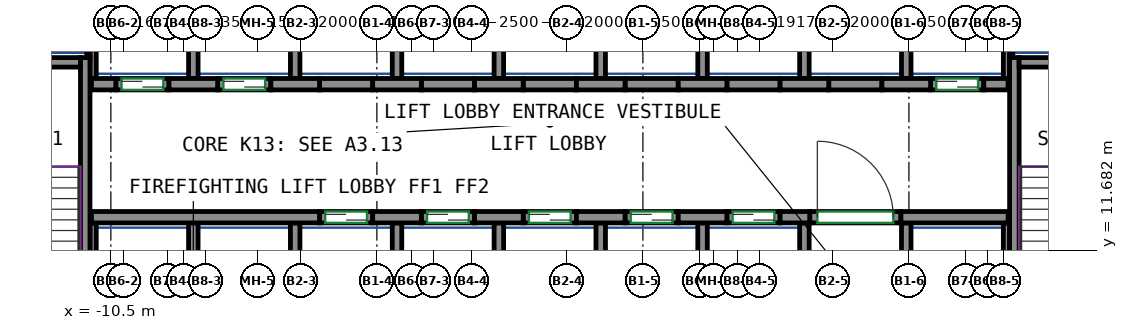
"""IFC4 building model, lengths in metres.
Left out: names, types, materials, properties, quantities, classifications, styles, units other than length and angle.
Written with IfcOpenShell. Run it as: python <this file> out.ifc"""

import sys

from ifc_helpers import new_model, si_unit, direction, frame, frame_2d, origin, place, context, subcontext, project, spatial, rectangle, extrude, source, transform, mapped, element, fill, save


model = new_model("IFC4")
c1 = context("Model", 3, precision=1e-05, world=origin(), true_north=direction((0.0, 1.0)))
c2 = subcontext(c1, "Body", "Model", "MODEL_VIEW")
j1 = project(units=[si_unit("LENGTHUNIT", "METRE"), si_unit("PLANEANGLEUNIT", "RADIAN")], contexts=[c1])
p1 = place(None, origin())
s1 = spatial("IfcSite", under=j1, at=p1, CompositionType="ELEMENT")
p2 = place(p1, origin())
s2 = spatial("IfcBuilding", under=s1, at=p2, CompositionType="ELEMENT")
p3 = place(p2, frame((0.0, 0.0, 55.0)))
s3 = spatial("IfcBuildingStorey", under=s2, at=p3, CompositionType="ELEMENT", Elevation=55.0)
m1 = source(origin(), c2, "Body", "SweptSolid", [
    extrude(rectangle(XDim=7.75, YDim=0.25, at=frame_2d((3.875, 0.0))), origin(), (0.0, 0.0, 1.0), 3.6),
])
p4 = place(p3, frame((-11.175, 9.0, 0.0), z_axis=(0.0, 0.0, 1.0), x_axis=(0.0, 1.0, 0.0)))
e1 = element("IfcWall", 1, at=p4, inside=s3, PredefinedType="SHEAR", context=c2, shape_type="MappedRepresentation", body=[
    mapped(m1, transform((0.0, 0.0, 0.0))),
])
m2 = source(origin(), c2, "Body", "SweptSolid", [
    extrude(rectangle(XDim=3.7, YDim=0.25, at=frame_2d((1.85, 0.0))), origin(), (0.0, 0.0, 1.0), 3.6),
])
p5 = place(p3, frame((-15.0, 16.625, 0.0), z_axis=(0.0, 0.0, 1.0), x_axis=(1.0, 0.0, 0.0)))
e2 = element("IfcWall", 2, at=p5, inside=s3, PredefinedType="SHEAR", context=c2, shape_type="MappedRepresentation", body=[
    mapped(m2, transform((0.0, 0.0, 0.0))),
])
p6 = place(p3, frame((13.275, 9.0, 0.0), z_axis=(0.0, 0.0, 1.0), x_axis=(0.0, 1.0, 0.0)))
e3 = element("IfcWall", 3, at=p6, inside=s3, PredefinedType="SHEAR", context=c2, shape_type="MappedRepresentation", body=[
    mapped(m1, transform((0.0, 0.0, 0.0))),
])
m3 = source(origin(), c2, "Body", "SweptSolid", [
    extrude(rectangle(XDim=3.7, YDim=0.25, at=frame_2d((1.85, 0.0))), origin(), (0.0, 0.0, 1.0), 3.6),
])
p7 = place(p3, frame((13.4, 16.625, 0.0), z_axis=(0.0, 0.0, 1.0), x_axis=(1.0, 0.0, 0.0)))
e4 = element("IfcWall", 4, at=p7, inside=s3, PredefinedType="SHEAR", context=c2, shape_type="MappedRepresentation", body=[
    mapped(m3, transform((0.0, 0.0, 0.0))),
])
m4 = source(origin(), c2, "Body", "SweptSolid", [
    extrude(rectangle(XDim=6.0, YDim=0.3, at=frame_2d((3.0, 0.0))), origin(), (0.0, 0.0, 1.0), 3.6),
])
p8 = place(p3, frame((-11.01, 12.55, 0.0), z_axis=(0.0, 0.0, 1.0), x_axis=(1.0, 0.0, 0.0)))
e5 = element("IfcWall", 5, at=p8, inside=s3, PredefinedType="SHEAR", context=c2, shape_type="MappedRepresentation", body=[
    mapped(m4, transform((0.0, 0.0, 0.0))),
])
m5 = source(origin(), c2, "Body", "SweptSolid", [
    extrude(rectangle(XDim=1.28, YDim=0.3, at=frame_2d((0.64, 0.0))), origin(), (0.0, 0.0, 1.0), 3.6),
])
for number, where, z_axis, x_axis in (
    (6, (-3.61, 12.55, 0.0), (0.0, 0.0, 1.0), (1.0, 0.0, 0.0)),
    (7, (-0.93, 12.55, 0.0), (0.0, 0.0, 1.0), (1.0, 0.0, 0.0)),
    (8, (1.75, 12.55, 0.0), (0.0, 0.0, 1.0), (1.0, 0.0, 0.0)),
    (9, (4.43, 12.55, 0.0), (0.0, 0.0, 1.0), (1.0, 0.0, 0.0)),
):
    element("IfcWall", number, at=place(p3, frame(where, z_axis=z_axis, x_axis=x_axis)), inside=s3, PredefinedType="SHEAR", context=c2, shape_type="MappedRepresentation", body=[
        mapped(m5, transform((0.0, 0.0, 0.0))),
    ])
m6 = source(origin(), c2, "Body", "SweptSolid", [
    extrude(rectangle(XDim=0.78, YDim=0.3, at=frame_2d((0.39, 0.0))), origin(), (0.0, 0.0, 1.0), 3.6),
])
p9 = place(p3, frame((7.11, 12.55, 0.0), z_axis=(0.0, 0.0, 1.0), x_axis=(1.0, 0.0, 0.0)))
e10 = element("IfcWall", 10, at=p9, inside=s3, PredefinedType="SHEAR", context=c2, shape_type="MappedRepresentation", body=[
    mapped(m6, transform((0.0, 0.0, 0.0))),
])
m7 = source(origin(), c2, "Body", "SweptSolid", [
    extrude(rectangle(XDim=2.82, YDim=0.3, at=frame_2d((1.41, 0.0))), origin(), (0.0, 0.0, 1.0), 3.6),
])
p10 = place(p3, frame((10.29, 12.55, 0.0), z_axis=(0.0, 0.0, 1.0), x_axis=(1.0, 0.0, 0.0)))
e11 = element("IfcWall", 11, at=p10, inside=s3, PredefinedType="SHEAR", context=c2, shape_type="MappedRepresentation", body=[
    mapped(m7, transform((0.0, 0.0, 0.0))),
])
m8 = source(origin(), c2, "Body", "SweptSolid", [
    extrude(rectangle(XDim=0.64, YDim=0.3, at=frame_2d((0.32, 0.0))), origin(), (0.0, 0.0, 1.0), 3.6),
])
p11 = place(p3, frame((-11.01, 16.05, 0.0), z_axis=(0.0, 0.0, 1.0), x_axis=(1.0, 0.0, 0.0)))
e12 = element("IfcWall", 12, at=p11, inside=s3, PredefinedType="SHEAR", context=c2, shape_type="MappedRepresentation", body=[
    mapped(m8, transform((0.0, 0.0, 0.0))),
])
for number, where, z_axis, x_axis in (
    (13, (-8.97, 16.05, 0.0), (0.0, 0.0, 1.0), (1.0, 0.0, 0.0)),
    (14, (-6.29, 16.05, 0.0), (0.0, 0.0, 1.0), (1.0, 0.0, 0.0)),
    (15, (-3.61, 16.05, 0.0), (0.0, 0.0, 1.0), (1.0, 0.0, 0.0)),
    (16, (-0.93, 16.05, 0.0), (0.0, 0.0, 1.0), (1.0, 0.0, 0.0)),
    (17, (1.75, 16.05, 0.0), (0.0, 0.0, 1.0), (1.0, 0.0, 0.0)),
    (18, (4.43, 16.05, 0.0), (0.0, 0.0, 1.0), (1.0, 0.0, 0.0)),
):
    element("IfcWall", number, at=place(p3, frame(where, z_axis=z_axis, x_axis=x_axis)), inside=s3, PredefinedType="SHEAR", context=c2, shape_type="MappedRepresentation", body=[
        mapped(m5, transform((0.0, 0.0, 0.0))),
    ])
m9 = source(origin(), c2, "Body", "SweptSolid", [
    extrude(rectangle(XDim=1.28, YDim=0.3, at=frame_2d((0.64, 0.0))), origin(), (0.0, 0.0, 1.0), 3.6),
])
p12 = place(p3, frame((7.11, 16.05, 0.0), z_axis=(0.0, 0.0, 1.0), x_axis=(1.0, 0.0, 0.0)))
e19 = element("IfcWall", 19, at=p12, inside=s3, PredefinedType="SHEAR", context=c2, shape_type="MappedRepresentation", body=[
    mapped(m9, transform((0.0, 0.0, 0.0))),
])
p13 = place(p3, frame((9.79, 16.05, 0.0), z_axis=(0.0, 0.0, 1.0), x_axis=(1.0, 0.0, 0.0)))
e20 = element("IfcWall", 20, at=p13, inside=s3, PredefinedType="SHEAR", context=c2, shape_type="MappedRepresentation", body=[
    mapped(m5, transform((0.0, 0.0, 0.0))),
])
m10 = source(origin(), c2, "Body", "SweptSolid", [
    extrude(rectangle(XDim=0.64, YDim=0.3, at=frame_2d((0.32, 0.0))), origin(), (0.0, 0.0, 1.0), 3.6),
])
p14 = place(p3, frame((12.47, 16.05, 0.0), z_axis=(0.0, 0.0, 1.0), x_axis=(1.0, 0.0, 0.0)))
e21 = element("IfcWall", 21, at=p14, inside=s3, PredefinedType="SHEAR", context=c2, shape_type="MappedRepresentation", body=[
    mapped(m10, transform((0.0, 0.0, 0.0))),
])
m11 = source(origin(), c2, "Body", "SweptSolid", [
    extrude(rectangle(XDim=1.4, YDim=0.3, at=frame_2d((0.7, 0.0))), origin(), (0.0, 0.0, 1.0), 3.6),
])
p15 = place(p3, frame((-5.01, 12.55, 0.0), z_axis=(0.0, 0.0, 1.0), x_axis=(1.0, 0.0, 0.0)))
e22 = element("IfcWall", 22, at=p15, inside=s3, PredefinedType="PARTITIONING", context=c2, shape_type="MappedRepresentation", body=[
    mapped(m11, transform((0.0, 0.0, 0.0))),
])
p16 = place(p15, frame((0.15, 0.0, 0.0)))
e23 = element("IfcOpeningElement", 23, at=p16, cuts=e22, PredefinedType="OPENING", context=c2, shape_type="SweptSolid", body=[
    extrude(rectangle(XDim=1.1, YDim=2.1, at=frame_2d((0.55, 1.05))), frame((0.0, 0.16, 0.0), z_axis=(0.0, -1.0, 0.0), x_axis=(1.0, 0.0, 0.0)), (0.0, 0.0, 1.0), 0.32),
])
m12 = source(origin(), c2, "Body", "SweptSolid", [
    extrude(rectangle(XDim=1.4, YDim=0.3, at=frame_2d((0.7, 0.0))), origin(), (0.0, 0.0, 1.0), 3.6),
])
p17 = place(p3, frame((-2.33, 12.55, 0.0), z_axis=(0.0, 0.0, 1.0), x_axis=(1.0, 0.0, 0.0)))
e24 = element("IfcWall", 24, at=p17, inside=s3, PredefinedType="PARTITIONING", context=c2, shape_type="MappedRepresentation", body=[
    mapped(m12, transform((0.0, 0.0, 0.0))),
])
p18 = place(p17, frame((0.15, 0.0, 0.0)))
e25 = element("IfcOpeningElement", 25, at=p18, cuts=e24, PredefinedType="OPENING", context=c2, shape_type="SweptSolid", body=[
    extrude(rectangle(XDim=1.1, YDim=2.1, at=frame_2d((0.55, 1.05))), frame((0.0, 0.16, 0.0), z_axis=(0.0, -1.0, 0.0), x_axis=(1.0, 0.0, 0.0)), (0.0, 0.0, 1.0), 0.32),
])
p19 = place(p3, frame((0.35, 12.55, 0.0), z_axis=(0.0, 0.0, 1.0), x_axis=(1.0, 0.0, 0.0)))
e26 = element("IfcWall", 26, at=p19, inside=s3, PredefinedType="PARTITIONING", context=c2, shape_type="MappedRepresentation", body=[
    mapped(m11, transform((0.0, 0.0, 0.0))),
])
p20 = place(p19, frame((0.15, 0.0, 0.0)))
e27 = element("IfcOpeningElement", 27, at=p20, cuts=e26, PredefinedType="OPENING", context=c2, shape_type="SweptSolid", body=[
    extrude(rectangle(XDim=1.1, YDim=2.1, at=frame_2d((0.55, 1.05))), frame((0.0, 0.16, 0.0), z_axis=(0.0, -1.0, 0.0), x_axis=(1.0, 0.0, 0.0)), (0.0, 0.0, 1.0), 0.32),
])
p21 = place(p3, frame((3.03, 12.55, 0.0), z_axis=(0.0, 0.0, 1.0), x_axis=(1.0, 0.0, 0.0)))
e28 = element("IfcWall", 28, at=p21, inside=s3, PredefinedType="PARTITIONING", context=c2, shape_type="MappedRepresentation", body=[
    mapped(m11, transform((0.0, 0.0, 0.0))),
])
p22 = place(p21, frame((0.15, 0.0, 0.0)))
e29 = element("IfcOpeningElement", 29, at=p22, cuts=e28, PredefinedType="OPENING", context=c2, shape_type="SweptSolid", body=[
    extrude(rectangle(XDim=1.1, YDim=2.1, at=frame_2d((0.55, 1.05))), frame((0.0, 0.16, 0.0), z_axis=(0.0, -1.0, 0.0), x_axis=(1.0, 0.0, 0.0)), (0.0, 0.0, 1.0), 0.32),
])
p23 = place(p3, frame((5.71, 12.55, 0.0), z_axis=(0.0, 0.0, 1.0), x_axis=(1.0, 0.0, 0.0)))
e30 = element("IfcWall", 30, at=p23, inside=s3, PredefinedType="PARTITIONING", context=c2, shape_type="MappedRepresentation", body=[
    mapped(m12, transform((0.0, 0.0, 0.0))),
])
p24 = place(p23, frame((0.15, 0.0, 0.0)))
e31 = element("IfcOpeningElement", 31, at=p24, cuts=e30, PredefinedType="OPENING", context=c2, shape_type="SweptSolid", body=[
    extrude(rectangle(XDim=1.1, YDim=2.1, at=frame_2d((0.55, 1.05))), frame((0.0, 0.16, 0.0), z_axis=(0.0, -1.0, 0.0), x_axis=(1.0, 0.0, 0.0)), (0.0, 0.0, 1.0), 0.32),
])
p25 = place(p3, frame((11.07, 16.05, 0.0), z_axis=(0.0, 0.0, 1.0), x_axis=(1.0, 0.0, 0.0)))
e32 = element("IfcWall", 32, at=p25, inside=s3, PredefinedType="PARTITIONING", context=c2, shape_type="MappedRepresentation", body=[
    mapped(m11, transform((0.0, 0.0, 0.0))),
])
p26 = place(p25, frame((0.15, 0.0, 0.0)))
e33 = element("IfcOpeningElement", 33, at=p26, cuts=e32, PredefinedType="OPENING", context=c2, shape_type="SweptSolid", body=[
    extrude(rectangle(XDim=1.1, YDim=2.1, at=frame_2d((0.55, 1.05))), frame((0.0, 0.16, 0.0), z_axis=(0.0, -1.0, 0.0), x_axis=(1.0, 0.0, 0.0)), (0.0, 0.0, 1.0), 0.32),
])
p27 = place(p3, frame((-10.37, 16.05, 0.0), z_axis=(0.0, 0.0, 1.0), x_axis=(1.0, 0.0, 0.0)))
e34 = element("IfcWall", 34, at=p27, inside=s3, PredefinedType="PARTITIONING", context=c2, shape_type="MappedRepresentation", body=[
    mapped(m12, transform((0.0, 0.0, 0.0))),
])
p28 = place(p27, frame((0.15, 0.0, 0.0)))
e35 = element("IfcOpeningElement", 35, at=p28, cuts=e34, PredefinedType="OPENING", context=c2, shape_type="SweptSolid", body=[
    extrude(rectangle(XDim=1.1, YDim=2.1, at=frame_2d((0.55, 1.05))), frame((0.0, 0.16, 0.0), z_axis=(0.0, -1.0, 0.0), x_axis=(1.0, 0.0, 0.0)), (0.0, 0.0, 1.0), 0.32),
])
p29 = place(p3, frame((-7.69, 16.05, 0.0), z_axis=(0.0, 0.0, 1.0), x_axis=(1.0, 0.0, 0.0)))
e36 = element("IfcWall", 36, at=p29, inside=s3, PredefinedType="PARTITIONING", context=c2, shape_type="MappedRepresentation", body=[
    mapped(m11, transform((0.0, 0.0, 0.0))),
])
p30 = place(p29, frame((0.15, 0.0, 0.0)))
e37 = element("IfcOpeningElement", 37, at=p30, cuts=e36, PredefinedType="OPENING", context=c2, shape_type="SweptSolid", body=[
    extrude(rectangle(XDim=1.1, YDim=2.1, at=frame_2d((0.55, 1.05))), frame((0.0, 0.16, 0.0), z_axis=(0.0, -1.0, 0.0), x_axis=(1.0, 0.0, 0.0)), (0.0, 0.0, 1.0), 0.32),
])
m13 = source(origin(), c2, "Body", "SweptSolid", [
    extrude(rectangle(XDim=2.4, YDim=0.3, at=frame_2d((1.2, 0.0))), origin(), (0.0, 0.0, 1.0), 3.6),
])
p31 = place(p3, frame((7.89, 12.55, 0.0), z_axis=(0.0, 0.0, 1.0), x_axis=(1.0, 0.0, 0.0)))
e38 = element("IfcWall", 38, at=p31, inside=s3, PredefinedType="PARTITIONING", context=c2, shape_type="MappedRepresentation", body=[
    mapped(m13, transform((0.0, 0.0, 0.0))),
])
p32 = place(p31, frame((0.2, 0.0, 0.0)))
e39 = element("IfcOpeningElement", 39, at=p32, cuts=e38, PredefinedType="OPENING", context=c2, shape_type="SweptSolid", body=[
    extrude(rectangle(XDim=2.0, YDim=2.1, at=frame_2d((1.0, 1.05))), frame((0.0, 0.16, 0.0), z_axis=(0.0, -1.0, 0.0), x_axis=(1.0, 0.0, 0.0)), (0.0, 0.0, 1.0), 0.32),
])
p33 = place(p3, frame((-5.01, 16.05, 0.0), z_axis=(0.0, 0.0, 1.0), x_axis=(1.0, 0.0, 0.0)))
e40 = element("IfcWall", 40, at=p33, inside=s3, PredefinedType="PARTITIONING", context=c2, shape_type="MappedRepresentation", body=[
    mapped(m11, transform((0.0, 0.0, 0.0))),
])
p34 = place(p3, frame((-2.33, 16.05, 0.0), z_axis=(0.0, 0.0, 1.0), x_axis=(1.0, 0.0, 0.0)))
e41 = element("IfcWall", 41, at=p34, inside=s3, PredefinedType="PARTITIONING", context=c2, shape_type="MappedRepresentation", body=[
    mapped(m12, transform((0.0, 0.0, 0.0))),
])
for number, where, z_axis, x_axis in (
    (42, (0.35, 16.05, 0.0), (0.0, 0.0, 1.0), (1.0, 0.0, 0.0)),
    (43, (3.03, 16.05, 0.0), (0.0, 0.0, 1.0), (1.0, 0.0, 0.0)),
):
    element("IfcWall", number, at=place(p3, frame(where, z_axis=z_axis, x_axis=x_axis)), inside=s3, PredefinedType="PARTITIONING", context=c2, shape_type="MappedRepresentation", body=[
        mapped(m11, transform((0.0, 0.0, 0.0))),
    ])
for number, where, z_axis, x_axis in (
    (44, (5.71, 16.05, 0.0), (0.0, 0.0, 1.0), (1.0, 0.0, 0.0)),
    (45, (8.39, 16.05, 0.0), (0.0, 0.0, 1.0), (1.0, 0.0, 0.0)),
):
    element("IfcWall", number, at=place(p3, frame(where, z_axis=z_axis, x_axis=x_axis)), inside=s3, PredefinedType="PARTITIONING", context=c2, shape_type="MappedRepresentation", body=[
        mapped(m12, transform((0.0, 0.0, 0.0))),
    ])
m14 = source(origin(), c2, "Body", "SweptSolid", [
    extrude(rectangle(XDim=3.275, YDim=0.165, at=frame_2d((1.638, 0.0))), origin(), (0.0, 0.0, 1.0), 3.6),
])
for number, where, z_axis, x_axis in (
    (46, (13.067, 16.2, 0.0), (0.0, 0.0, 1.0), (0.0, 1.0, 0.0)),
    (47, (-10.968, 16.2, 0.0), (0.0, 0.0, 1.0), (0.0, 1.0, 0.0)),
):
    element("IfcWall", number, at=place(p3, frame(where, z_axis=z_axis, x_axis=x_axis)), inside=s3, PredefinedType="PARTITIONING", context=c2, shape_type="MappedRepresentation", body=[
        mapped(m14, transform((0.0, 0.0, 0.0))),
    ])
m15 = source(origin(), c2, "Body", "SweptSolid", [
    extrude(rectangle(XDim=3.275, YDim=0.25, at=frame_2d((1.638, 0.0))), origin(), (0.0, 0.0, 1.0), 3.6),
])
p35 = place(p3, frame((10.43, 16.2, 0.0), z_axis=(0.0, 0.0, 1.0), x_axis=(0.0, 1.0, 0.0)))
e48 = element("IfcWall", 48, at=p35, inside=s3, PredefinedType="PARTITIONING", context=c2, shape_type="MappedRepresentation", body=[
    mapped(m15, transform((0.0, 0.0, 0.0))),
])
m16 = source(origin(), c2, "Body", "SweptSolid", [
    extrude(rectangle(XDim=2.725, YDim=0.085, at=frame_2d((1.363, 0.0))), origin(), (0.0, 0.0, 1.0), 3.6),
])
p36 = place(p3, frame((13.192, 16.75, 0.0), z_axis=(0.0, 0.0, 1.0), x_axis=(0.0, 1.0, 0.0)))
e49 = element("IfcWall", 49, at=p36, inside=s3, PredefinedType="PARTITIONING", context=c2, shape_type="MappedRepresentation", body=[
    mapped(m16, transform((0.0, 0.0, 0.0))),
])
for number, where, z_axis, x_axis in (
    (50, (2.39, 16.2, 0.0), (0.0, 0.0, 1.0), (0.0, 1.0, 0.0)),
    (51, (5.07, 16.2, 0.0), (0.0, 0.0, 1.0), (0.0, 1.0, 0.0)),
    (52, (7.75, 16.2, 0.0), (0.0, 0.0, 1.0), (0.0, 1.0, 0.0)),
    (53, (-0.29, 16.2, 0.0), (0.0, 0.0, 1.0), (0.0, 1.0, 0.0)),
):
    element("IfcWall", number, at=place(p3, frame(where, z_axis=z_axis, x_axis=x_axis)), inside=s3, PredefinedType="PARTITIONING", context=c2, shape_type="MappedRepresentation", body=[
        mapped(m15, transform((0.0, 0.0, 0.0))),
    ])
p37 = place(p3, frame((-11.093, 16.75, 0.0), z_axis=(0.0, 0.0, 1.0), x_axis=(0.0, 1.0, 0.0)))
e54 = element("IfcWall", 54, at=p37, inside=s3, PredefinedType="PARTITIONING", context=c2, shape_type="MappedRepresentation", body=[
    mapped(m16, transform((0.0, 0.0, 0.0))),
])
for number, where, z_axis, x_axis in (
    (55, (-2.97, 16.2, 0.0), (0.0, 0.0, 1.0), (0.0, 1.0, 0.0)),
    (56, (-5.65, 16.2, 0.0), (0.0, 0.0, 1.0), (0.0, 1.0, 0.0)),
    (57, (-8.33, 16.2, 0.0), (0.0, 0.0, 1.0), (0.0, 1.0, 0.0)),
):
    element("IfcWall", number, at=place(p3, frame(where, z_axis=z_axis, x_axis=x_axis)), inside=s3, PredefinedType="PARTITIONING", context=c2, shape_type="MappedRepresentation", body=[
        mapped(m15, transform((0.0, 0.0, 0.0))),
    ])
m17 = source(origin(), c2, "Body", "SweptSolid", [
    extrude(rectangle(XDim=3.4, YDim=0.25, at=frame_2d((1.7, 0.0))), origin(), (0.0, 0.0, 1.0), 3.6),
])
p38 = place(p3, frame((10.43, 9.0, 0.0), z_axis=(0.0, 0.0, 1.0), x_axis=(0.0, 1.0, 0.0)))
e58 = element("IfcWall", 58, at=p38, inside=s3, PredefinedType="PARTITIONING", context=c2, shape_type="MappedRepresentation", body=[
    mapped(m17, transform((0.0, 0.0, 0.0))),
])
m18 = source(origin(), c2, "Body", "SweptSolid", [
    extrude(rectangle(XDim=3.4, YDim=0.165, at=frame_2d((1.7, 0.0))), origin(), (0.0, 0.0, 1.0), 3.6),
])
p39 = place(p3, frame((13.067, 9.0, 0.0), z_axis=(0.0, 0.0, 1.0), x_axis=(0.0, 1.0, 0.0)))
e59 = element("IfcWall", 59, at=p39, inside=s3, PredefinedType="PARTITIONING", context=c2, shape_type="MappedRepresentation", body=[
    mapped(m18, transform((0.0, 0.0, 0.0))),
])
for number, where, z_axis, x_axis in (
    (60, (2.39, 9.0, 0.0), (0.0, 0.0, 1.0), (0.0, 1.0, 0.0)),
    (61, (5.07, 9.0, 0.0), (0.0, 0.0, 1.0), (0.0, 1.0, 0.0)),
    (62, (7.75, 9.0, 0.0), (0.0, 0.0, 1.0), (0.0, 1.0, 0.0)),
    (63, (-0.29, 9.0, 0.0), (0.0, 0.0, 1.0), (0.0, 1.0, 0.0)),
):
    element("IfcWall", number, at=place(p3, frame(where, z_axis=z_axis, x_axis=x_axis)), inside=s3, PredefinedType="PARTITIONING", context=c2, shape_type="MappedRepresentation", body=[
        mapped(m17, transform((0.0, 0.0, 0.0))),
    ])
p40 = place(p3, frame((-10.968, 9.0, 0.0), z_axis=(0.0, 0.0, 1.0), x_axis=(0.0, 1.0, 0.0)))
e64 = element("IfcWall", 64, at=p40, inside=s3, PredefinedType="PARTITIONING", context=c2, shape_type="MappedRepresentation", body=[
    mapped(m18, transform((0.0, 0.0, 0.0))),
])
for number, where, z_axis, x_axis in (
    (65, (-2.97, 9.0, 0.0), (0.0, 0.0, 1.0), (0.0, 1.0, 0.0)),
    (66, (-5.65, 9.0, 0.0), (0.0, 0.0, 1.0), (0.0, 1.0, 0.0)),
    (67, (-8.33, 9.0, 0.0), (0.0, 0.0, 1.0), (0.0, 1.0, 0.0)),
):
    element("IfcWall", number, at=place(p3, frame(where, z_axis=z_axis, x_axis=x_axis)), inside=s3, PredefinedType="PARTITIONING", context=c2, shape_type="MappedRepresentation", body=[
        mapped(m17, transform((0.0, 0.0, 0.0))),
    ])
p41 = place(p32, origin())
e68 = element("IfcDoor", 68, at=p41, inside=s3, OperationType="DOUBLE_DOOR_SINGLE_SWING", PredefinedType="DOOR", context=c2, shape_type="SweptSolid", body=[
    extrude(rectangle(XDim=2.0, YDim=2.1, at=frame_2d((1.0, 1.05))), frame((0.0, 0.025, 0.0), z_axis=(0.0, -1.0, 0.0), x_axis=(1.0, 0.0, 0.0)), (0.0, 0.0, 1.0), 0.05),
])
fill(e39, e68)
p42 = place(p16, origin())
e69 = element("IfcDoor", 69, at=p42, inside=s3, OperationType="DOUBLE_DOOR_SLIDING", PredefinedType="DOOR", context=c2, shape_type="SweptSolid", body=[
    extrude(rectangle(XDim=1.1, YDim=2.1, at=frame_2d((0.55, 1.05))), frame((0.0, 0.025, 0.0), z_axis=(0.0, -1.0, 0.0), x_axis=(1.0, 0.0, 0.0)), (0.0, 0.0, 1.0), 0.05),
])
fill(e23, e69)
p43 = place(p18, origin())
e70 = element("IfcDoor", 70, at=p43, inside=s3, OperationType="DOUBLE_DOOR_SLIDING", PredefinedType="DOOR", context=c2, shape_type="SweptSolid", body=[
    extrude(rectangle(XDim=1.1, YDim=2.1, at=frame_2d((0.55, 1.05))), frame((0.0, 0.025, 0.0), z_axis=(0.0, -1.0, 0.0), x_axis=(1.0, 0.0, 0.0)), (0.0, 0.0, 1.0), 0.05),
])
fill(e25, e70)
p44 = place(p20, origin())
e71 = element("IfcDoor", 71, at=p44, inside=s3, OperationType="DOUBLE_DOOR_SLIDING", PredefinedType="DOOR", context=c2, shape_type="SweptSolid", body=[
    extrude(rectangle(XDim=1.1, YDim=2.1, at=frame_2d((0.55, 1.05))), frame((0.0, 0.025, 0.0), z_axis=(0.0, -1.0, 0.0), x_axis=(1.0, 0.0, 0.0)), (0.0, 0.0, 1.0), 0.05),
])
fill(e27, e71)
p45 = place(p22, origin())
e72 = element("IfcDoor", 72, at=p45, inside=s3, OperationType="DOUBLE_DOOR_SLIDING", PredefinedType="DOOR", context=c2, shape_type="SweptSolid", body=[
    extrude(rectangle(XDim=1.1, YDim=2.1, at=frame_2d((0.55, 1.05))), frame((0.0, 0.025, 0.0), z_axis=(0.0, -1.0, 0.0), x_axis=(1.0, 0.0, 0.0)), (0.0, 0.0, 1.0), 0.05),
])
fill(e29, e72)
p46 = place(p24, origin())
e73 = element("IfcDoor", 73, at=p46, inside=s3, OperationType="DOUBLE_DOOR_SLIDING", PredefinedType="DOOR", context=c2, shape_type="SweptSolid", body=[
    extrude(rectangle(XDim=1.1, YDim=2.1, at=frame_2d((0.55, 1.05))), frame((0.0, 0.025, 0.0), z_axis=(0.0, -1.0, 0.0), x_axis=(1.0, 0.0, 0.0)), (0.0, 0.0, 1.0), 0.05),
])
fill(e31, e73)
p47 = place(p26, origin())
e74 = element("IfcDoor", 74, at=p47, inside=s3, OperationType="DOUBLE_DOOR_SLIDING", PredefinedType="DOOR", context=c2, shape_type="SweptSolid", body=[
    extrude(rectangle(XDim=1.1, YDim=2.1, at=frame_2d((0.55, 1.05))), frame((0.0, 0.025, 0.0), z_axis=(0.0, -1.0, 0.0), x_axis=(1.0, 0.0, 0.0)), (0.0, 0.0, 1.0), 0.05),
])
fill(e33, e74)
p48 = place(p28, origin())
e75 = element("IfcDoor", 75, at=p48, inside=s3, OperationType="DOUBLE_DOOR_SLIDING", PredefinedType="DOOR", context=c2, shape_type="SweptSolid", body=[
    extrude(rectangle(XDim=1.1, YDim=2.1, at=frame_2d((0.55, 1.05))), frame((0.0, 0.025, 0.0), z_axis=(0.0, -1.0, 0.0), x_axis=(1.0, 0.0, 0.0)), (0.0, 0.0, 1.0), 0.05),
])
fill(e35, e75)
p49 = place(p30, origin())
e76 = element("IfcDoor", 76, at=p49, inside=s3, OperationType="DOUBLE_DOOR_SLIDING", PredefinedType="DOOR", context=c2, shape_type="SweptSolid", body=[
    extrude(rectangle(XDim=1.1, YDim=2.1, at=frame_2d((0.55, 1.05))), frame((0.0, 0.025, 0.0), z_axis=(0.0, -1.0, 0.0), x_axis=(1.0, 0.0, 0.0)), (0.0, 0.0, 1.0), 0.05),
])
fill(e37, e76)
save(model, sys.argv[1])
